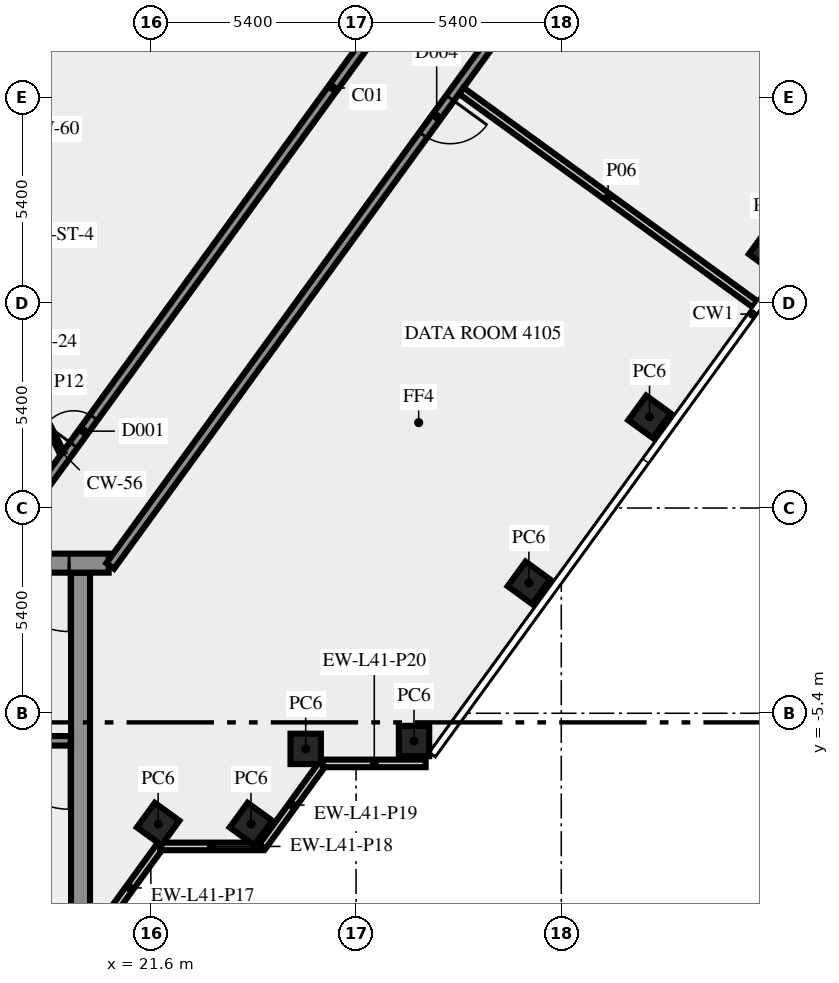
"""IFC4 building model, lengths in metres.
Left out: names, types, materials, properties, quantities, classifications, styles, units other than length and angle.
Written with IfcOpenShell. Run it as: python <this file> out.ifc"""

import sys

from ifc_helpers import new_model, si_unit, direction, frame, frame_2d, origin, origin_2d, place, context, subcontext, project, spatial, rectangle, extrude, element, fill, save


model = new_model("IFC4")
c1 = context("Model", 3, precision=1e-05, world=origin(), true_north=direction((0.0, 1.0)))
c2 = subcontext(c1, "Body", "Model", "MODEL_VIEW")
j1 = project(units=[si_unit("LENGTHUNIT", "METRE"), si_unit("PLANEANGLEUNIT", "RADIAN")], contexts=[c1])
p1 = place(None, origin())
s1 = spatial("IfcSite", under=j1, at=p1, CompositionType="ELEMENT")
p2 = place(p1, origin())
s2 = spatial("IfcBuilding", under=s1, at=p2, CompositionType="ELEMENT")
p3 = place(p2, frame((0.0, 0.0, 176.0)))
s3 = spatial("IfcBuildingStorey", under=s2, at=p3, CompositionType="ELEMENT", Elevation=176.0)
for number, where, z_axis, x_axis in (
    (1, (21.792, -8.315, 0.0), (0.0, 0.0, 1.0), (0.588, 0.809, 0.0)),
    (2, (24.235, -8.315, 0.0), (0.0, 0.0, 1.0), (0.588, 0.809, 0.0)),
    (3, (25.674, -6.337, 0.0), (0.0, 0.0, 1.0), (1.0, 0.0, 0.0)),
    (4, (28.525, -6.13, 0.0), (0.0, 0.0, 1.0), (1.0, 0.0, 0.0)),
    (5, (31.548, -1.969, 0.0), (0.0, 0.0, 1.0), (0.588, 0.809, 0.0)),
    (6, (34.722, 2.4, 0.0), (0.0, 0.0, 1.0), (0.588, 0.809, 0.0)),
    (7, (37.896, 6.769, 0.0), (0.0, 0.0, 1.0), (0.588, 0.809, 0.0)),
):
    element("IfcColumn", number, at=place(p3, frame(where, z_axis=z_axis, x_axis=x_axis)), inside=s3, PredefinedType="COLUMN", context=c2, shape_type="SweptSolid", body=[
        extrude(rectangle(XDim=0.8, YDim=0.8, at=origin_2d()), origin(), (0.0, 0.0, 1.0), 3.65),
    ])
p4 = place(p3, frame((20.253, -11.083, 0.0), z_axis=(0.0, 0.0, 1.0), x_axis=(0.587766567315, 0.809030569476, 0.0)))
e8 = element("IfcWall", 8, at=p4, inside=s3, PredefinedType="SOLIDWALL", context=c2, shape_type="SweptSolid", body=[
    extrude(rectangle(XDim=2.688, YDim=0.2, at=frame_2d((1.344, 0.0))), origin(), (0.0, 0.0, 1.0), 3.65),
])
p5 = place(p3, frame((21.843, -8.904, 0.0), z_axis=(0.0, 0.0, 1.0), x_axis=(1.0, 0.0, 0.0)))
e9 = element("IfcWall", 9, at=p5, inside=s3, PredefinedType="SOLIDWALL", context=c2, shape_type="SweptSolid", body=[
    extrude(rectangle(XDim=2.7, YDim=0.2, at=frame_2d((1.35, 0.0))), origin(), (0.0, 0.0, 1.0), 3.65),
])
p6 = place(p3, frame((24.533, -8.909, 0.0), z_axis=(0.0, 0.0, 1.0), x_axis=(0.587720002413, 0.809064397168, 0.0)))
e10 = element("IfcWall", 10, at=p6, inside=s3, PredefinedType="SOLIDWALL", context=c2, shape_type="SweptSolid", body=[
    extrude(rectangle(XDim=2.7, YDim=0.2, at=frame_2d((1.35, 0.0))), origin(), (0.0, 0.0, 1.0), 3.65),
])
p7 = place(p3, frame((26.13, -6.719, 0.0), z_axis=(0.0, 0.0, 1.0), x_axis=(1.0, 0.0, 0.0)))
e11 = element("IfcWall", 11, at=p7, inside=s3, PredefinedType="SOLIDWALL", context=c2, shape_type="SweptSolid", body=[
    extrude(rectangle(XDim=2.7, YDim=0.2, at=frame_2d((1.35, 0.0))), origin(), (0.0, 0.0, 1.0), 3.65),
])
p8 = place(p3, frame((19.75, -10.5, 0.0), z_axis=(0.0, 0.0, 1.0), x_axis=(0.0, 1.0, 0.0)))
e12 = element("IfcWall", 12, at=p8, inside=s3, PredefinedType="SHEAR", context=c2, shape_type="SweptSolid", body=[
    extrude(rectangle(XDim=8.8, YDim=0.5, at=frame_2d((4.4, 0.0))), origin(), (0.0, 0.0, 1.0), 3.65),
])
p9 = place(p3, frame((19.5, -6.125, 0.0), z_axis=(0.0, 0.0, 1.0), x_axis=(-1.0, 0.0, 0.0)))
e13 = element("IfcWall", 13, at=p9, inside=s3, PredefinedType="SHEAR", context=c2, shape_type="SweptSolid", body=[
    extrude(rectangle(XDim=8.05, YDim=0.25, at=frame_2d((4.025, 0.0))), origin(), (0.0, 0.0, 1.0), 3.65),
])
p10 = place(p9, frame((0.05, 0.0, 0.0)))
e14 = element("IfcOpeningElement", 14, at=p10, cuts=e13, PredefinedType="OPENING", context=c2, shape_type="SweptSolid", body=[
    extrude(rectangle(XDim=1.8, YDim=2.1, at=frame_2d((0.9, 1.05))), frame((0.0, 0.135, 0.0), z_axis=(0.0, -1.0, 0.0), x_axis=(1.0, 0.0, 0.0)), (0.0, 0.0, 1.0), 0.27),
])
p11 = place(p3, frame((20.49, -1.45, 0.0), z_axis=(0.0, 0.0, 1.0), x_axis=(-1.0, 0.0, 0.0)))
e15 = element("IfcWall", 15, at=p11, inside=s3, PredefinedType="SHEAR", context=c2, shape_type="SweptSolid", body=[
    extrude(rectangle(XDim=40.98, YDim=0.5, at=frame_2d((20.49, 0.0))), origin(), (0.0, 0.0, 1.0), 3.65),
])
p12 = place(p11, frame((38.14, 0.0, 0.0)))
e16 = element("IfcOpeningElement", 16, at=p12, cuts=e15, PredefinedType="OPENING", context=c2, shape_type="SweptSolid", body=[
    extrude(rectangle(XDim=1.8, YDim=2.1, at=frame_2d((0.9, 1.05))), frame((0.0, 0.26, 0.0), z_axis=(0.0, -1.0, 0.0), x_axis=(1.0, 0.0, 0.0)), (0.0, 0.0, 1.0), 0.52),
])
p13 = place(p11, frame((36.728, 0.0, 0.0)))
e17 = element("IfcOpeningElement", 17, at=p13, cuts=e15, PredefinedType="OPENING", context=c2, shape_type="SweptSolid", body=[
    extrude(rectangle(XDim=0.8, YDim=2.1, at=frame_2d((0.4, 1.05))), frame((0.0, 0.26, 0.0), z_axis=(0.0, -1.0, 0.0), x_axis=(1.0, 0.0, 0.0)), (0.0, 0.0, 1.0), 0.52),
])
p14 = place(p11, frame((35.153, 0.0, 0.0)))
e18 = element("IfcOpeningElement", 18, at=p14, cuts=e15, PredefinedType="OPENING", context=c2, shape_type="SweptSolid", body=[
    extrude(rectangle(XDim=0.8, YDim=2.1, at=frame_2d((0.4, 1.05))), frame((0.0, 0.26, 0.0), z_axis=(0.0, -1.0, 0.0), x_axis=(1.0, 0.0, 0.0)), (0.0, 0.0, 1.0), 0.52),
])
p15 = place(p11, frame((32.94, 0.0, 0.0)))
e19 = element("IfcOpeningElement", 19, at=p15, cuts=e15, PredefinedType="OPENING", context=c2, shape_type="SweptSolid", body=[
    extrude(rectangle(XDim=0.9, YDim=2.1, at=frame_2d((0.45, 1.05))), frame((0.0, 0.26, 0.0), z_axis=(0.0, -1.0, 0.0), x_axis=(1.0, 0.0, 0.0)), (0.0, 0.0, 1.0), 0.52),
])
p16 = place(p11, frame((27.84, 0.0, 0.0)))
e20 = element("IfcOpeningElement", 20, at=p16, cuts=e15, PredefinedType="OPENING", context=c2, shape_type="SweptSolid", body=[
    extrude(rectangle(XDim=0.9, YDim=2.1, at=frame_2d((0.45, 1.05))), frame((0.0, 0.26, 0.0), z_axis=(0.0, -1.0, 0.0), x_axis=(1.0, 0.0, 0.0)), (0.0, 0.0, 1.0), 0.52),
])
p17 = place(p11, frame((21.765, 0.0, 0.0)))
e21 = element("IfcOpeningElement", 21, at=p17, cuts=e15, PredefinedType="OPENING", context=c2, shape_type="SweptSolid", body=[
    extrude(rectangle(XDim=2.0, YDim=2.1, at=frame_2d((1.0, 1.05))), frame((0.0, 0.26, 0.0), z_axis=(0.0, -1.0, 0.0), x_axis=(1.0, 0.0, 0.0)), (0.0, 0.0, 1.0), 0.52),
])
p18 = place(p11, frame((7.14, 0.0, 0.0)))
e22 = element("IfcOpeningElement", 22, at=p18, cuts=e15, PredefinedType="OPENING", context=c2, shape_type="SweptSolid", body=[
    extrude(rectangle(XDim=0.9, YDim=2.1, at=frame_2d((0.45, 1.05))), frame((0.0, 0.26, 0.0), z_axis=(0.0, -1.0, 0.0), x_axis=(1.0, 0.0, 0.0)), (0.0, 0.0, 1.0), 0.52),
])
p19 = place(p11, frame((4.19, 0.0, 0.0)))
e23 = element("IfcOpeningElement", 23, at=p19, cuts=e15, PredefinedType="OPENING", context=c2, shape_type="SweptSolid", body=[
    extrude(rectangle(XDim=0.9, YDim=2.1, at=frame_2d((0.45, 1.05))), frame((0.0, 0.26, 0.0), z_axis=(0.0, -1.0, 0.0), x_axis=(1.0, 0.0, 0.0)), (0.0, 0.0, 1.0), 0.52),
])
p20 = place(p11, frame((1.04, 0.0, 0.0)))
e24 = element("IfcOpeningElement", 24, at=p20, cuts=e15, PredefinedType="OPENING", context=c2, shape_type="SweptSolid", body=[
    extrude(rectangle(XDim=1.8, YDim=2.1, at=frame_2d((0.9, 1.05))), frame((0.0, 0.26, 0.0), z_axis=(0.0, -1.0, 0.0), x_axis=(1.0, 0.0, 0.0)), (0.0, 0.0, 1.0), 0.52),
])
p21 = place(p3, frame((17.545, -1.125, 0.0), z_axis=(0.0, 0.0, 1.0), x_axis=(0.587786330937, 0.809016210693, 0.0)))
e25 = element("IfcWall", 25, at=p21, inside=s3, PredefinedType="SOLIDWALL", context=c2, shape_type="SweptSolid", body=[
    extrude(rectangle(XDim=30.103, YDim=0.25, at=frame_2d((15.052, 0.0))), origin(), (0.0, 0.0, 1.0), 3.65),
])
p22 = place(p21, frame((3.441, 0.0, 0.0)))
e26 = element("IfcOpeningElement", 26, at=p22, cuts=e25, PredefinedType="OPENING", context=c2, shape_type="SweptSolid", body=[
    extrude(rectangle(XDim=0.9, YDim=2.1, at=frame_2d((0.45, 1.05))), frame((0.0, 0.135, 0.0), z_axis=(0.0, -1.0, 0.0), x_axis=(1.0, 0.0, 0.0)), (0.0, 0.0, 1.0), 0.27),
])
p23 = place(p21, frame((23.158, 0.0, 0.0)))
e27 = element("IfcOpeningElement", 27, at=p23, cuts=e25, PredefinedType="OPENING", context=c2, shape_type="SweptSolid", body=[
    extrude(rectangle(XDim=0.9, YDim=2.1, at=frame_2d((0.45, 1.05))), frame((0.0, 0.135, 0.0), z_axis=(0.0, -1.0, 0.0), x_axis=(1.0, 0.0, 0.0)), (0.0, 0.0, 1.0), 0.27),
])
p24 = place(p21, frame((21.558, 0.0, 0.0)))
e28 = element("IfcOpeningElement", 28, at=p24, cuts=e25, PredefinedType="OPENING", context=c2, shape_type="SweptSolid", body=[
    extrude(rectangle(XDim=0.9, YDim=2.1, at=frame_2d((0.45, 1.05))), frame((0.0, 0.135, 0.0), z_axis=(0.0, -1.0, 0.0), x_axis=(1.0, 0.0, 0.0)), (0.0, 0.0, 1.0), 0.27),
])
p25 = place(p3, frame((37.236, 21.469, 0.0), z_axis=(0.0, 0.0, 1.0), x_axis=(-0.58778344073, -0.809018310549, 0.0)))
e29 = element("IfcWall", 29, at=p25, inside=s3, PredefinedType="SOLIDWALL", context=c2, shape_type="SweptSolid", body=[
    extrude(rectangle(XDim=28.42, YDim=0.25, at=frame_2d((14.21, 0.0))), origin(), (0.0, 0.0, 1.0), 3.65),
])
p26 = place(p25, frame((13.205, 0.0, 0.0)))
e30 = element("IfcOpeningElement", 30, at=p26, cuts=e29, PredefinedType="OPENING", context=c2, shape_type="SweptSolid", body=[
    extrude(rectangle(XDim=1.2, YDim=2.1, at=frame_2d((0.6, 1.05))), frame((0.0, 0.135, 0.0), z_axis=(0.0, -1.0, 0.0), x_axis=(1.0, 0.0, 0.0)), (0.0, 0.0, 1.0), 0.27),
])
p27 = place(p25, frame((0.224, 0.0, 0.0)))
e31 = element("IfcOpeningElement", 31, at=p27, cuts=e29, PredefinedType="OPENING", context=c2, shape_type="SweptSolid", body=[
    extrude(rectangle(XDim=0.9, YDim=2.1, at=frame_2d((0.45, 1.05))), frame((0.0, 0.135, 0.0), z_axis=(0.0, -1.0, 0.0), x_axis=(1.0, 0.0, 0.0)), (0.0, 0.0, 1.0), 0.27),
])
p28 = place(p3, frame((37.496, 5.367, 0.0), z_axis=(0.0, 0.0, 1.0), x_axis=(-0.809048817734, 0.587741448702, 0.0)))
e32 = element("IfcWall", 32, at=p28, inside=s3, PredefinedType="SOLIDWALL", context=c2, shape_type="SweptSolid", body=[
    extrude(rectangle(XDim=9.55, YDim=0.2, at=frame_2d((4.775, 0.0))), origin(), (0.0, 0.0, 1.0), 2.85),
])
p29 = place(p3, frame((18.0, 3.925, 0.0), z_axis=(0.0, 0.0, 1.0), x_axis=(0.453950796792, -0.891026752736, 0.0)))
e33 = element("IfcWall", 33, at=p29, inside=s3, PredefinedType="PARTITIONING", context=c2, shape_type="SweptSolid", body=[
    extrude(rectangle(XDim=2.778, YDim=0.12, at=frame_2d((1.389, 0.0))), origin(), (0.0, 0.0, 1.0), 3.65),
])
p30 = place(p10, origin())
e34 = element("IfcDoor", 34, at=p30, inside=s3, OperationType="DOUBLE_DOOR_SINGLE_SWING", PredefinedType="DOOR", context=c2, shape_type="SweptSolid", body=[
    extrude(rectangle(XDim=1.8, YDim=2.1, at=frame_2d((0.9, 1.05))), frame((0.0, 0.025, 0.0), z_axis=(0.0, -1.0, 0.0), x_axis=(1.0, 0.0, 0.0)), (0.0, 0.0, 1.0), 0.05),
])
fill(e14, e34)
p31 = place(p20, origin())
e35 = element("IfcDoor", 35, at=p31, inside=s3, OperationType="DOUBLE_DOOR_SINGLE_SWING", PredefinedType="DOOR", context=c2, shape_type="SweptSolid", body=[
    extrude(rectangle(XDim=1.8, YDim=2.1, at=frame_2d((0.9, 1.05))), frame((0.0, 0.025, 0.0), z_axis=(0.0, -1.0, 0.0), x_axis=(1.0, 0.0, 0.0)), (0.0, 0.0, 1.0), 0.05),
])
fill(e24, e35)
p32 = place(p26, origin())
e36 = element("IfcDoor", 36, at=p32, inside=s3, OperationType="SINGLE_SWING_LEFT", PredefinedType="DOOR", context=c2, shape_type="SweptSolid", body=[
    extrude(rectangle(XDim=1.2, YDim=2.1, at=frame_2d((0.6, 1.05))), frame((0.0, 0.025, 0.0), z_axis=(0.0, -1.0, 0.0), x_axis=(1.0, 0.0, 0.0)), (0.0, 0.0, 1.0), 0.05),
])
fill(e30, e36)
p33 = place(p22, origin())
e37 = element("IfcDoor", 37, at=p33, inside=s3, OperationType="SINGLE_SWING_LEFT", PredefinedType="DOOR", context=c2, shape_type="SweptSolid", body=[
    extrude(rectangle(XDim=0.9, YDim=2.1, at=frame_2d((0.45, 1.05))), frame((0.0, 0.025, 0.0), z_axis=(0.0, -1.0, 0.0), x_axis=(1.0, 0.0, 0.0)), (0.0, 0.0, 1.0), 0.05),
])
fill(e26, e37)
save(model, sys.argv[1])
